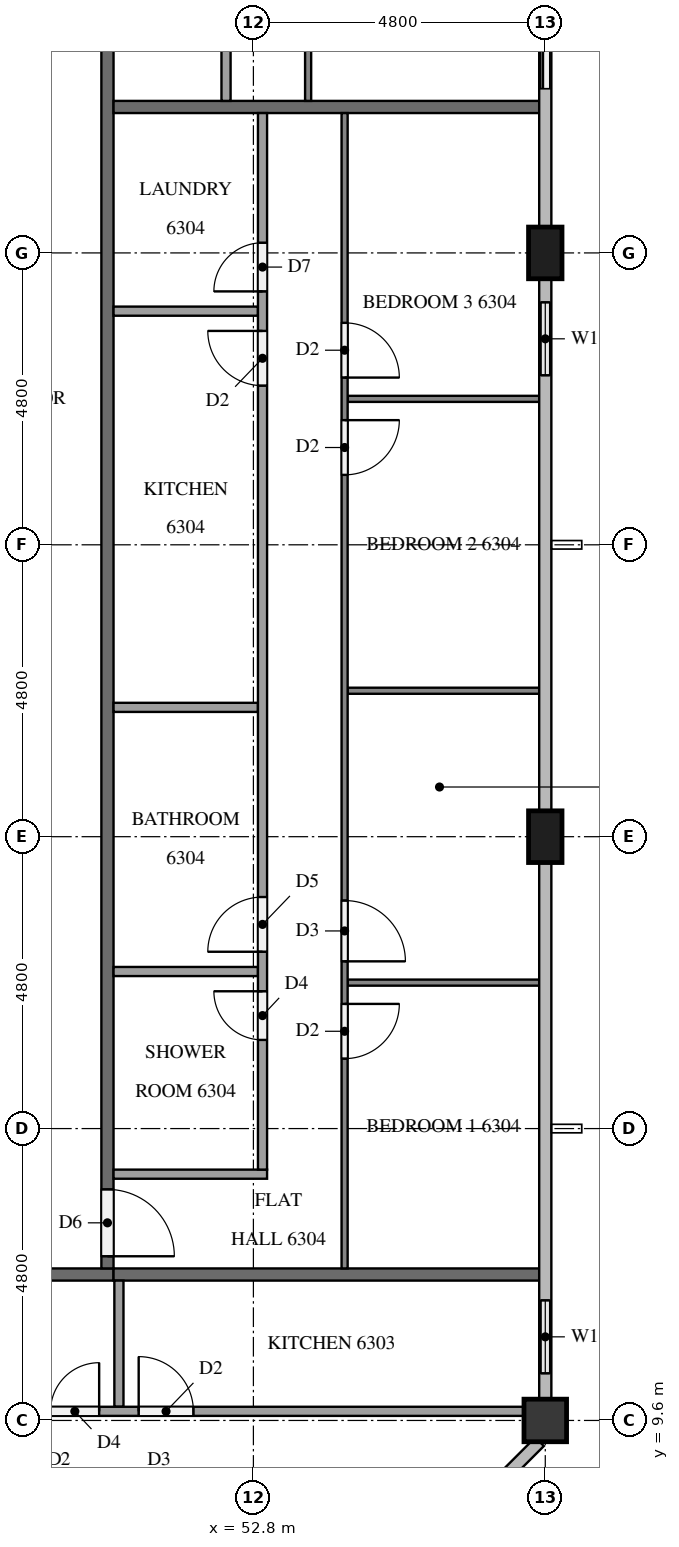
"""IFC4 building model, lengths in metres.
Left out: names, types, materials, properties, quantities, classifications, styles, units other than length and angle.
Written with IfcOpenShell. Run it as: python <this file> out.ifc"""

import sys

from ifc_helpers import new_model, si_unit, direction, frame, frame_2d, origin, origin_2d, place, context, subcontext, project, spatial, rectangle, extrude, element, fill, save


model = new_model("IFC4")
c1 = context("Model", 3, precision=1e-05, world=origin(), true_north=direction((0.0, 1.0)))
c2 = subcontext(c1, "Body", "Model", "MODEL_VIEW")
j1 = project(units=[si_unit("LENGTHUNIT", "METRE"), si_unit("PLANEANGLEUNIT", "RADIAN")], contexts=[c1])
p1 = place(None, origin())
s1 = spatial("IfcSite", under=j1, at=p1, CompositionType="ELEMENT")
p2 = place(p1, origin())
s2 = spatial("IfcBuilding", under=s1, at=p2, CompositionType="ELEMENT")
p3 = place(p2, frame((0.0, 0.0, 242.2)))
s3 = spatial("IfcBuildingStorey", under=s2, at=p3, CompositionType="ELEMENT", Elevation=242.2)
p4 = place(p3, frame((57.6, 9.6, 0.0), z_axis=(0.0, 0.0, 1.0), x_axis=(1.0, 0.0, 0.0)))
e1 = element("IfcColumn", 1, at=p4, inside=s3, PredefinedType="COLUMN", context=c2, shape_type="SweptSolid", body=[
    extrude(rectangle(XDim=0.7, YDim=0.7, at=origin_2d()), origin(), (0.0, 0.0, 1.0), 3.2),
])
for number, where, z_axis, x_axis in (
    (2, (57.6, 19.2, 0.0), (0.0, 0.0, 1.0), (0.0, 1.0, 0.0)),
    (3, (57.6, 28.8, 0.0), (0.0, 0.0, 1.0), (0.0, 1.0, 0.0)),
):
    element("IfcColumn", number, at=place(p3, frame(where, z_axis=z_axis, x_axis=x_axis)), inside=s3, PredefinedType="COLUMN", context=c2, shape_type="SweptSolid", body=[
        extrude(rectangle(XDim=0.85, YDim=0.55, at=origin_2d()), origin(), (0.0, 0.0, 1.0), 3.2),
    ])
p5 = place(p3, frame((57.6, 9.95, 0.0), z_axis=(0.0, 0.0, 1.0), x_axis=(0.0, 1.0, 0.0)))
e4 = element("IfcWall", 4, at=p5, inside=s3, PredefinedType="SOLIDWALL", context=c2, shape_type="SweptSolid", body=[
    extrude(rectangle(XDim=2.05, YDim=0.15, at=frame_2d((1.025, 0.0))), origin(), (0.0, 0.0, 1.0), 3.2),
])
p6 = place(p5, frame((0.425, 0.0, 0.9)))
e5 = element("IfcOpeningElement", 5, at=p6, cuts=e4, PredefinedType="OPENING", context=c2, shape_type="SweptSolid", body=[
    extrude(rectangle(XDim=1.2, YDim=1.4, at=frame_2d((0.6, 0.7))), frame((0.0, 0.085, 0.0), z_axis=(0.0, -1.0, 0.0), x_axis=(1.0, 0.0, 0.0)), (0.0, 0.0, 1.0), 0.17),
])
p7 = place(p3, frame((57.6, 26.4, 0.0), z_axis=(0.0, 0.0, 1.0), x_axis=(0.0, 1.0, 0.0)))
e6 = element("IfcWall", 6, at=p7, inside=s3, PredefinedType="SOLIDWALL", context=c2, shape_type="SweptSolid", body=[
    extrude(rectangle(XDim=1.975, YDim=0.15, at=frame_2d((0.988, 0.0))), origin(), (0.0, 0.0, 1.0), 3.2),
])
p8 = place(p7, frame((0.387, 0.0, 0.9)))
e7 = element("IfcOpeningElement", 7, at=p8, cuts=e6, PredefinedType="OPENING", context=c2, shape_type="SweptSolid", body=[
    extrude(rectangle(XDim=1.2, YDim=1.4, at=frame_2d((0.6, 0.7))), frame((0.0, 0.085, 0.0), z_axis=(0.0, -1.0, 0.0), x_axis=(1.0, 0.0, 0.0)), (0.0, 0.0, 1.0), 0.17),
])
p9 = place(p3, frame((57.6, 31.2, 0.0), z_axis=(0.0, 0.0, 1.0), x_axis=(0.0, 1.0, 0.0)))
e8 = element("IfcWall", 8, at=p9, inside=s3, PredefinedType="SOLIDWALL", context=c2, shape_type="SweptSolid", body=[
    extrude(rectangle(XDim=2.4, YDim=0.15, at=frame_2d((1.2, 0.0))), origin(), (0.0, 0.0, 1.0), 3.2),
])
p10 = place(p9, frame((0.3, 0.0, 0.0)))
e9 = element("IfcOpeningElement", 9, at=p10, cuts=e8, PredefinedType="OPENING", context=c2, shape_type="SweptSolid", body=[
    extrude(rectangle(XDim=1.8, YDim=2.4, at=frame_2d((0.9, 1.2))), frame((0.0, 0.085, 0.0), z_axis=(0.0, -1.0, 0.0), x_axis=(1.0, 0.0, 0.0)), (0.0, 0.0, 1.0), 0.17),
])
p11 = place(p3, frame((50.5, 12.0, 0.0), z_axis=(0.0, 0.0, 1.0), x_axis=(-1.0, 0.0, 0.0)))
e10 = element("IfcWall", 10, at=p11, inside=s3, PredefinedType="PARTITIONING", context=c2, shape_type="SweptSolid", body=[
    extrude(rectangle(XDim=38.6, YDim=0.2, at=frame_2d((19.3, 0.0))), origin(), (0.0, 0.0, 1.0), 3.2),
])
p12 = place(p11, frame((37.1, 0.0, 0.0)))
e11 = element("IfcOpeningElement", 11, at=p12, cuts=e10, PredefinedType="OPENING", context=c2, shape_type="SweptSolid", body=[
    extrude(rectangle(XDim=1.1, YDim=2.1, at=frame_2d((0.55, 1.05))), frame((0.0, 0.11, 0.0), z_axis=(0.0, -1.0, 0.0), x_axis=(1.0, 0.0, 0.0)), (0.0, 0.0, 1.0), 0.22),
])
p13 = place(p11, frame((17.95, 0.0, 0.0)))
e12 = element("IfcOpeningElement", 12, at=p13, cuts=e10, PredefinedType="OPENING", context=c2, shape_type="SweptSolid", body=[
    extrude(rectangle(XDim=1.0, YDim=2.1, at=frame_2d((0.5, 1.05))), frame((0.0, 0.11, 0.0), z_axis=(0.0, -1.0, 0.0), x_axis=(1.0, 0.0, 0.0)), (0.0, 0.0, 1.0), 0.22),
])
p14 = place(p11, frame((8.35, 0.0, 0.0)))
e13 = element("IfcOpeningElement", 13, at=p14, cuts=e10, PredefinedType="OPENING", context=c2, shape_type="SweptSolid", body=[
    extrude(rectangle(XDim=1.0, YDim=2.1, at=frame_2d((0.5, 1.05))), frame((0.0, 0.11, 0.0), z_axis=(0.0, -1.0, 0.0), x_axis=(1.0, 0.0, 0.0)), (0.0, 0.0, 1.0), 0.22),
])
p15 = place(p3, frame((50.4, 40.7, 0.0), z_axis=(0.0, 0.0, 1.0), x_axis=(0.0, -1.0, 0.0)))
e14 = element("IfcWall", 14, at=p15, inside=s3, PredefinedType="PARTITIONING", context=c2, shape_type="SweptSolid", body=[
    extrude(rectangle(XDim=28.6, YDim=0.2, at=frame_2d((14.3, 0.0))), origin(), (0.0, 0.0, 1.0), 3.2),
])
p16 = place(p15, frame((27.3, 0.0, 0.0)))
e15 = element("IfcOpeningElement", 15, at=p16, cuts=e14, PredefinedType="OPENING", context=c2, shape_type="SweptSolid", body=[
    extrude(rectangle(XDim=1.1, YDim=2.1, at=frame_2d((0.55, 1.05))), frame((0.0, 0.11, 0.0), z_axis=(0.0, -1.0, 0.0), x_axis=(1.0, 0.0, 0.0)), (0.0, 0.0, 1.0), 0.22),
])
p17 = place(p15, frame((0.25, 0.0, 0.0)))
e16 = element("IfcOpeningElement", 16, at=p17, cuts=e14, PredefinedType="OPENING", context=c2, shape_type="SweptSolid", body=[
    extrude(rectangle(XDim=1.0, YDim=2.1, at=frame_2d((0.5, 1.05))), frame((0.0, 0.11, 0.0), z_axis=(0.0, -1.0, 0.0), x_axis=(1.0, 0.0, 0.0)), (0.0, 0.0, 1.0), 0.22),
])
for number, where, z_axis, x_axis in (
    (17, (50.5, 12.0, 0.0), (0.0, 0.0, 1.0), (1.0, 0.0, 0.0)),
    (18, (50.5, 31.2, 0.0), (0.0, 0.0, 1.0), (1.0, 0.0, 0.0)),
):
    element("IfcWall", number, at=place(p3, frame(where, z_axis=z_axis, x_axis=x_axis)), inside=s3, PredefinedType="PARTITIONING", context=c2, shape_type="SweptSolid", body=[
        extrude(rectangle(XDim=7.0, YDim=0.2, at=frame_2d((3.5, 0.0))), origin(), (0.0, 0.0, 1.0), 3.2),
    ])
p18 = place(p3, frame((50.588, 11.9, 0.0), z_axis=(0.0, 0.0, 1.0), x_axis=(0.0, -1.0, 0.0)))
e19 = element("IfcWall", 19, at=p18, inside=s3, PredefinedType="PARTITIONING", context=c2, shape_type="SweptSolid", body=[
    extrude(rectangle(XDim=2.075, YDim=0.15, at=frame_2d((1.038, 0.0))), origin(), (0.0, 0.0, 1.0), 3.2),
])
p19 = place(p3, frame((42.525, 9.75, 0.0), z_axis=(0.0, 0.0, 1.0), x_axis=(1.0, 0.0, 0.0)))
e20 = element("IfcWall", 20, at=p19, inside=s3, PredefinedType="PARTITIONING", context=c2, shape_type="SweptSolid", body=[
    extrude(rectangle(XDim=14.725, YDim=0.15, at=frame_2d((7.363, 0.0))), origin(), (0.0, 0.0, 1.0), 3.2),
])
p20 = place(p19, frame((0.3, 0.0, 0.0)))
e21 = element("IfcOpeningElement", 21, at=p20, cuts=e20, PredefinedType="OPENING", context=c2, shape_type="SweptSolid", body=[
    extrude(rectangle(XDim=0.9, YDim=2.1, at=frame_2d((0.45, 1.05))), frame((0.0, 0.085, 0.0), z_axis=(0.0, -1.0, 0.0), x_axis=(1.0, 0.0, 0.0)), (0.0, 0.0, 1.0), 0.17),
])
p21 = place(p19, frame((6.938, 0.0, 0.0)))
e22 = element("IfcOpeningElement", 22, at=p21, cuts=e20, PredefinedType="OPENING", context=c2, shape_type="SweptSolid", body=[
    extrude(rectangle(XDim=0.8, YDim=2.1, at=frame_2d((0.4, 1.05))), frame((0.0, 0.085, 0.0), z_axis=(0.0, -1.0, 0.0), x_axis=(1.0, 0.0, 0.0)), (0.0, 0.0, 1.0), 0.17),
])
p22 = place(p19, frame((8.388, 0.0, 0.0)))
e23 = element("IfcOpeningElement", 23, at=p22, cuts=e20, PredefinedType="OPENING", context=c2, shape_type="SweptSolid", body=[
    extrude(rectangle(XDim=0.9, YDim=2.1, at=frame_2d((0.45, 1.05))), frame((0.0, 0.085, 0.0), z_axis=(0.0, -1.0, 0.0), x_axis=(1.0, 0.0, 0.0)), (0.0, 0.0, 1.0), 0.17),
])
for number, where, z_axis, x_axis in (
    (24, (54.35, 16.8, 0.0), (0.0, 0.0, 1.0), (1.0, 0.0, 0.0)),
    (25, (54.35, 21.6, 0.0), (0.0, 0.0, 1.0), (1.0, 0.0, 0.0)),
    (26, (54.35, 26.4, 0.0), (0.0, 0.0, 1.0), (1.0, 0.0, 0.0)),
):
    element("IfcWall", number, at=place(p3, frame(where, z_axis=z_axis, x_axis=x_axis)), inside=s3, PredefinedType="PARTITIONING", context=c2, shape_type="SweptSolid", body=[
        extrude(rectangle(XDim=3.15, YDim=0.1, at=frame_2d((1.575, 0.0))), origin(), (0.0, 0.0, 1.0), 3.2),
    ])
p23 = place(p3, frame((54.3, 31.1, 0.0), z_axis=(0.0, 0.0, 1.0), x_axis=(0.0, -1.0, 0.0)))
e27 = element("IfcWall", 27, at=p23, inside=s3, PredefinedType="PARTITIONING", context=c2, shape_type="SweptSolid", body=[
    extrude(rectangle(XDim=19.0, YDim=0.1, at=frame_2d((9.5, 0.0))), origin(), (0.0, 0.0, 1.0), 3.2),
])
p24 = place(p23, frame((14.65, 0.0, 0.0)))
e28 = element("IfcOpeningElement", 28, at=p24, cuts=e27, PredefinedType="OPENING", context=c2, shape_type="SweptSolid", body=[
    extrude(rectangle(XDim=0.9, YDim=2.1, at=frame_2d((0.45, 1.05))), frame((0.0, 0.06, 0.0), z_axis=(0.0, -1.0, 0.0), x_axis=(1.0, 0.0, 0.0)), (0.0, 0.0, 1.0), 0.12),
])
p25 = place(p23, frame((12.95, 0.0, 0.0)))
e29 = element("IfcOpeningElement", 29, at=p25, cuts=e27, PredefinedType="OPENING", context=c2, shape_type="SweptSolid", body=[
    extrude(rectangle(XDim=1.0, YDim=2.1, at=frame_2d((0.5, 1.05))), frame((0.0, 0.06, 0.0), z_axis=(0.0, -1.0, 0.0), x_axis=(1.0, 0.0, 0.0)), (0.0, 0.0, 1.0), 0.12),
])
p26 = place(p23, frame((5.05, 0.0, 0.0)))
e30 = element("IfcOpeningElement", 30, at=p26, cuts=e27, PredefinedType="OPENING", context=c2, shape_type="SweptSolid", body=[
    extrude(rectangle(XDim=0.9, YDim=2.1, at=frame_2d((0.45, 1.05))), frame((0.0, 0.06, 0.0), z_axis=(0.0, -1.0, 0.0), x_axis=(1.0, 0.0, 0.0)), (0.0, 0.0, 1.0), 0.12),
])
p27 = place(p23, frame((3.45, 0.0, 0.0)))
e31 = element("IfcOpeningElement", 31, at=p27, cuts=e27, PredefinedType="OPENING", context=c2, shape_type="SweptSolid", body=[
    extrude(rectangle(XDim=0.9, YDim=2.1, at=frame_2d((0.45, 1.05))), frame((0.0, 0.06, 0.0), z_axis=(0.0, -1.0, 0.0), x_axis=(1.0, 0.0, 0.0)), (0.0, 0.0, 1.0), 0.12),
])
for number, where, z_axis, x_axis in (
    (32, (50.5, 16.983, 0.0), (0.0, 0.0, 1.0), (1.0, 0.0, 0.0)),
    (33, (50.5, 21.327, 0.0), (0.0, 0.0, 1.0), (1.0, 0.0, 0.0)),
    (34, (50.5, 27.842, 0.0), (0.0, 0.0, 1.0), (1.0, 0.0, 0.0)),
):
    element("IfcWall", number, at=place(p3, frame(where, z_axis=z_axis, x_axis=x_axis)), inside=s3, PredefinedType="PARTITIONING", context=c2, shape_type="SweptSolid", body=[
        extrude(rectangle(XDim=2.375, YDim=0.15, at=frame_2d((1.188, 0.0))), origin(), (0.0, 0.0, 1.0), 3.2),
    ])
p28 = place(p3, frame((50.5, 13.65, 0.0), z_axis=(0.0, 0.0, 1.0), x_axis=(1.0, 0.0, 0.0)))
e35 = element("IfcWall", 35, at=p28, inside=s3, PredefinedType="PARTITIONING", context=c2, shape_type="SweptSolid", body=[
    extrude(rectangle(XDim=2.525, YDim=0.15, at=frame_2d((1.262, 0.0))), origin(), (0.0, 0.0, 1.0), 3.2),
])
p29 = place(p3, frame((52.95, 13.725, 0.0), z_axis=(0.0, 0.0, 1.0), x_axis=(0.0, 1.0, 0.0)))
e36 = element("IfcWall", 36, at=p29, inside=s3, PredefinedType="PARTITIONING", context=c2, shape_type="SweptSolid", body=[
    extrude(rectangle(XDim=17.375, YDim=0.15, at=frame_2d((8.688, 0.0))), origin(), (0.0, 0.0, 1.0), 3.2),
])
p30 = place(p29, frame((2.133, 0.0, 0.0)))
e37 = element("IfcOpeningElement", 37, at=p30, cuts=e36, PredefinedType="OPENING", context=c2, shape_type="SweptSolid", body=[
    extrude(rectangle(XDim=0.8, YDim=2.1, at=frame_2d((0.4, 1.05))), frame((0.0, 0.085, 0.0), z_axis=(0.0, -1.0, 0.0), x_axis=(1.0, 0.0, 0.0)), (0.0, 0.0, 1.0), 0.17),
])
p31 = place(p29, frame((3.583, 0.0, 0.0)))
e38 = element("IfcOpeningElement", 38, at=p31, cuts=e36, PredefinedType="OPENING", context=c2, shape_type="SweptSolid", body=[
    extrude(rectangle(XDim=0.9, YDim=2.1, at=frame_2d((0.45, 1.05))), frame((0.0, 0.085, 0.0), z_axis=(0.0, -1.0, 0.0), x_axis=(1.0, 0.0, 0.0)), (0.0, 0.0, 1.0), 0.17),
])
p32 = place(p29, frame((12.892, 0.0, 0.0)))
e39 = element("IfcOpeningElement", 39, at=p32, cuts=e36, PredefinedType="OPENING", context=c2, shape_type="SweptSolid", body=[
    extrude(rectangle(XDim=0.9, YDim=2.1, at=frame_2d((0.45, 1.05))), frame((0.0, 0.085, 0.0), z_axis=(0.0, -1.0, 0.0), x_axis=(1.0, 0.0, 0.0)), (0.0, 0.0, 1.0), 0.17),
])
p33 = place(p29, frame((14.442, 0.0, 0.0)))
e40 = element("IfcOpeningElement", 40, at=p33, cuts=e36, PredefinedType="OPENING", context=c2, shape_type="SweptSolid", body=[
    extrude(rectangle(XDim=0.8, YDim=2.1, at=frame_2d((0.4, 1.05))), frame((0.0, 0.085, 0.0), z_axis=(0.0, -1.0, 0.0), x_axis=(1.0, 0.0, 0.0)), (0.0, 0.0, 1.0), 0.17),
])
p34 = place(p3, frame((53.7, 40.7, 0.0), z_axis=(0.0, 0.0, 1.0), x_axis=(0.0, -1.0, 0.0)))
e41 = element("IfcWall", 41, at=p34, inside=s3, PredefinedType="PARTITIONING", context=c2, shape_type="SweptSolid", body=[
    extrude(rectangle(XDim=9.4, YDim=0.1, at=frame_2d((4.7, 0.0))), origin(), (0.0, 0.0, 1.0), 3.2),
])
p35 = place(p34, frame((3.45, 0.0, 0.0)))
e42 = element("IfcOpeningElement", 42, at=p35, cuts=e41, PredefinedType="OPENING", context=c2, shape_type="SweptSolid", body=[
    extrude(rectangle(XDim=0.9, YDim=2.1, at=frame_2d((0.45, 1.05))), frame((0.0, 0.06, 0.0), z_axis=(0.0, -1.0, 0.0), x_axis=(1.0, 0.0, 0.0)), (0.0, 0.0, 1.0), 0.12),
])
p36 = place(p34, frame((5.05, 0.0, 0.0)))
e43 = element("IfcOpeningElement", 43, at=p36, cuts=e41, PredefinedType="OPENING", context=c2, shape_type="SweptSolid", body=[
    extrude(rectangle(XDim=1.0, YDim=2.1, at=frame_2d((0.5, 1.05))), frame((0.0, 0.06, 0.0), z_axis=(0.0, -1.0, 0.0), x_axis=(1.0, 0.0, 0.0)), (0.0, 0.0, 1.0), 0.12),
])
p37 = place(p3, frame((52.35, 31.3, 0.0), z_axis=(0.0, 0.0, 1.0), x_axis=(0.0, 1.0, 0.0)))
e44 = element("IfcWall", 44, at=p37, inside=s3, PredefinedType="PARTITIONING", context=c2, shape_type="SweptSolid", body=[
    extrude(rectangle(XDim=7.775, YDim=0.15, at=frame_2d((3.887, 0.0))), origin(), (0.0, 0.0, 1.0), 3.2),
])
p38 = place(p37, frame((4.99, 0.0, 0.0)))
e45 = element("IfcOpeningElement", 45, at=p38, cuts=e44, PredefinedType="OPENING", context=c2, shape_type="SweptSolid", body=[
    extrude(rectangle(XDim=0.8, YDim=2.1, at=frame_2d((0.4, 1.05))), frame((0.0, 0.085, 0.0), z_axis=(0.0, -1.0, 0.0), x_axis=(1.0, 0.0, 0.0)), (0.0, 0.0, 1.0), 0.17),
])
p39 = place(p37, frame((3.44, 0.0, 0.0)))
e46 = element("IfcOpeningElement", 46, at=p39, cuts=e44, PredefinedType="OPENING", context=c2, shape_type="SweptSolid", body=[
    extrude(rectangle(XDim=0.9, YDim=2.1, at=frame_2d((0.45, 1.05))), frame((0.0, 0.085, 0.0), z_axis=(0.0, -1.0, 0.0), x_axis=(1.0, 0.0, 0.0)), (0.0, 0.0, 1.0), 0.17),
])
p40 = place(p6, origin())
e47 = element("IfcWindow", 47, at=p40, inside=s3, PartitioningType="SINGLE_PANEL", PredefinedType="WINDOW", context=c2, shape_type="SweptSolid", body=[
    extrude(rectangle(XDim=1.2, YDim=1.4, at=frame_2d((0.6, 0.7))), frame((0.0, 0.03, 0.0), z_axis=(0.0, -1.0, 0.0), x_axis=(1.0, 0.0, 0.0)), (0.0, 0.0, 1.0), 0.06),
])
fill(e5, e47)
p41 = place(p8, origin())
e48 = element("IfcWindow", 48, at=p41, inside=s3, PartitioningType="SINGLE_PANEL", PredefinedType="WINDOW", context=c2, shape_type="SweptSolid", body=[
    extrude(rectangle(XDim=1.2, YDim=1.4, at=frame_2d((0.6, 0.7))), frame((0.0, 0.03, 0.0), z_axis=(0.0, -1.0, 0.0), x_axis=(1.0, 0.0, 0.0)), (0.0, 0.0, 1.0), 0.06),
])
fill(e7, e48)
p42 = place(p10, origin())
e49 = element("IfcDoor", 49, at=p42, inside=s3, OperationType="SLIDING_TO_LEFT", PredefinedType="DOOR", context=c2, shape_type="SweptSolid", body=[
    extrude(rectangle(XDim=1.8, YDim=2.4, at=frame_2d((0.9, 1.2))), frame((0.0, 0.025, 0.0), z_axis=(0.0, -1.0, 0.0), x_axis=(1.0, 0.0, 0.0)), (0.0, 0.0, 1.0), 0.05),
])
fill(e9, e49)
p43 = place(p16, origin())
e50 = element("IfcDoor", 50, at=p43, inside=s3, OperationType="SINGLE_SWING_RIGHT", PredefinedType="DOOR", context=c2, shape_type="SweptSolid", body=[
    extrude(rectangle(XDim=1.1, YDim=2.1, at=frame_2d((0.55, 1.05))), frame((0.0, 0.025, 0.0), z_axis=(0.0, -1.0, 0.0), x_axis=(1.0, 0.0, 0.0)), (0.0, 0.0, 1.0), 0.05),
])
fill(e15, e50)
p44 = place(p21, origin())
e51 = element("IfcDoor", 51, at=p44, inside=s3, OperationType="SINGLE_SWING_RIGHT", PredefinedType="DOOR", context=c2, shape_type="SweptSolid", body=[
    extrude(rectangle(XDim=0.8, YDim=2.1, at=frame_2d((0.4, 1.05))), frame((0.0, 0.025, 0.0), z_axis=(0.0, -1.0, 0.0), x_axis=(1.0, 0.0, 0.0)), (0.0, 0.0, 1.0), 0.05),
])
fill(e22, e51)
p45 = place(p22, origin())
e52 = element("IfcDoor", 52, at=p45, inside=s3, OperationType="SINGLE_SWING_LEFT", PredefinedType="DOOR", context=c2, shape_type="SweptSolid", body=[
    extrude(rectangle(XDim=0.9, YDim=2.1, at=frame_2d((0.45, 1.05))), frame((0.0, 0.025, 0.0), z_axis=(0.0, -1.0, 0.0), x_axis=(1.0, 0.0, 0.0)), (0.0, 0.0, 1.0), 0.05),
])
fill(e23, e52)
p46 = place(p24, origin())
e53 = element("IfcDoor", 53, at=p46, inside=s3, OperationType="SINGLE_SWING_LEFT", PredefinedType="DOOR", context=c2, shape_type="SweptSolid", body=[
    extrude(rectangle(XDim=0.9, YDim=2.1, at=frame_2d((0.45, 1.05))), frame((0.0, 0.025, 0.0), z_axis=(0.0, -1.0, 0.0), x_axis=(1.0, 0.0, 0.0)), (0.0, 0.0, 1.0), 0.05),
])
fill(e28, e53)
p47 = place(p25, origin())
e54 = element("IfcDoor", 54, at=p47, inside=s3, OperationType="SINGLE_SWING_RIGHT", PredefinedType="DOOR", context=c2, shape_type="SweptSolid", body=[
    extrude(rectangle(XDim=1.0, YDim=2.1, at=frame_2d((0.5, 1.05))), frame((0.0, 0.025, 0.0), z_axis=(0.0, -1.0, 0.0), x_axis=(1.0, 0.0, 0.0)), (0.0, 0.0, 1.0), 0.05),
])
fill(e29, e54)
p48 = place(p26, origin())
e55 = element("IfcDoor", 55, at=p48, inside=s3, OperationType="SINGLE_SWING_LEFT", PredefinedType="DOOR", context=c2, shape_type="SweptSolid", body=[
    extrude(rectangle(XDim=0.9, YDim=2.1, at=frame_2d((0.45, 1.05))), frame((0.0, 0.025, 0.0), z_axis=(0.0, -1.0, 0.0), x_axis=(1.0, 0.0, 0.0)), (0.0, 0.0, 1.0), 0.05),
])
fill(e30, e55)
p49 = place(p27, origin())
e56 = element("IfcDoor", 56, at=p49, inside=s3, OperationType="SINGLE_SWING_RIGHT", PredefinedType="DOOR", context=c2, shape_type="SweptSolid", body=[
    extrude(rectangle(XDim=0.9, YDim=2.1, at=frame_2d((0.45, 1.05))), frame((0.0, 0.025, 0.0), z_axis=(0.0, -1.0, 0.0), x_axis=(1.0, 0.0, 0.0)), (0.0, 0.0, 1.0), 0.05),
])
fill(e31, e56)
p50 = place(p30, origin())
e57 = element("IfcDoor", 57, at=p50, inside=s3, OperationType="SINGLE_SWING_RIGHT", PredefinedType="DOOR", context=c2, shape_type="SweptSolid", body=[
    extrude(rectangle(XDim=0.8, YDim=2.1, at=frame_2d((0.4, 1.05))), frame((0.0, 0.025, 0.0), z_axis=(0.0, -1.0, 0.0), x_axis=(1.0, 0.0, 0.0)), (0.0, 0.0, 1.0), 0.05),
])
fill(e37, e57)
p51 = place(p31, origin())
e58 = element("IfcDoor", 58, at=p51, inside=s3, OperationType="SINGLE_SWING_LEFT", PredefinedType="DOOR", context=c2, shape_type="SweptSolid", body=[
    extrude(rectangle(XDim=0.9, YDim=2.1, at=frame_2d((0.45, 1.05))), frame((0.0, 0.025, 0.0), z_axis=(0.0, -1.0, 0.0), x_axis=(1.0, 0.0, 0.0)), (0.0, 0.0, 1.0), 0.05),
])
fill(e38, e58)
p52 = place(p32, origin())
e59 = element("IfcDoor", 59, at=p52, inside=s3, OperationType="SINGLE_SWING_RIGHT", PredefinedType="DOOR", context=c2, shape_type="SweptSolid", body=[
    extrude(rectangle(XDim=0.9, YDim=2.1, at=frame_2d((0.45, 1.05))), frame((0.0, 0.025, 0.0), z_axis=(0.0, -1.0, 0.0), x_axis=(1.0, 0.0, 0.0)), (0.0, 0.0, 1.0), 0.05),
])
fill(e39, e59)
p53 = place(p33, origin())
e60 = element("IfcDoor", 60, at=p53, inside=s3, OperationType="SINGLE_SWING_LEFT", PredefinedType="DOOR", context=c2, shape_type="SweptSolid", body=[
    extrude(rectangle(XDim=0.8, YDim=2.1, at=frame_2d((0.4, 1.05))), frame((0.0, 0.025, 0.0), z_axis=(0.0, -1.0, 0.0), x_axis=(1.0, 0.0, 0.0)), (0.0, 0.0, 1.0), 0.05),
])
fill(e40, e60)
save(model, sys.argv[1])
